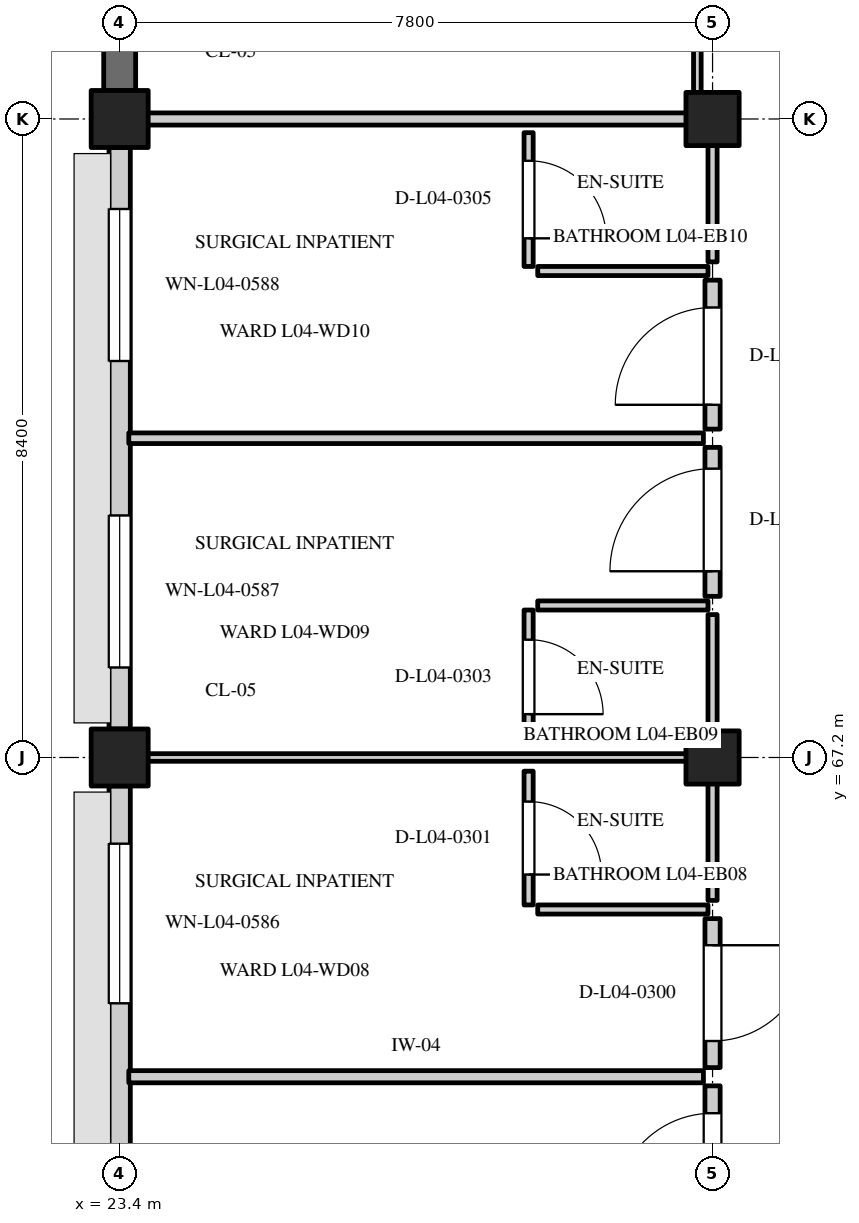
"""IFC4 building model, lengths in metres.
Left out: names, types, materials, properties, quantities, classifications, styles, units other than length and angle.
Written with IfcOpenShell. Run it as: python <this file> out.ifc"""

import sys

from ifc_helpers import new_model, si_unit, direction, frame, frame_2d, origin, origin_2d, place, context, subcontext, project, spatial, rectangle, extrude, element, fill, save


model = new_model("IFC4")
c1 = context("Model", 3, precision=1e-05, world=origin(), true_north=direction((0.0, 1.0)))
c2 = subcontext(c1, "Body", "Model", "MODEL_VIEW")
j1 = project(units=[si_unit("LENGTHUNIT", "METRE"), si_unit("PLANEANGLEUNIT", "RADIAN")], contexts=[c1])
p1 = place(None, origin())
s1 = spatial("IfcSite", under=j1, at=p1, CompositionType="ELEMENT")
p2 = place(p1, origin())
s2 = spatial("IfcBuilding", under=s1, at=p2, CompositionType="ELEMENT")
p3 = place(p2, frame((0.0, 0.0, 18.0)))
s3 = spatial("IfcBuildingStorey", under=s2, at=p3, CompositionType="ELEMENT", Elevation=18.0)
for number, where, z_axis, x_axis in (
    (1, (23.4, 67.2, 0.0), (0.0, 0.0, 1.0), (1.0, 0.0, 0.0)),
    (2, (23.4, 75.6, 0.0), (0.0, 0.0, 1.0), (1.0, 0.0, 0.0)),
):
    element("IfcColumn", number, at=place(p3, frame(where, z_axis=z_axis, x_axis=x_axis)), inside=s3, PredefinedType="COLUMN", context=c2, shape_type="SweptSolid", body=[
        extrude(rectangle(XDim=0.75, YDim=0.75, at=origin_2d()), origin(), (0.0, 0.0, 1.0), 4.2),
    ])
for number, where, z_axis, x_axis in (
    (3, (31.2, 67.2, 0.0), (0.0, 0.0, 1.0), (1.0, 0.0, 0.0)),
    (4, (31.2, 75.6, 0.0), (0.0, 0.0, 1.0), (1.0, 0.0, 0.0)),
):
    element("IfcColumn", number, at=place(p3, frame(where, z_axis=z_axis, x_axis=x_axis)), inside=s3, PredefinedType="COLUMN", context=c2, shape_type="SweptSolid", body=[
        extrude(rectangle(XDim=0.7, YDim=0.7, at=origin_2d()), origin(), (0.0, 0.0, 1.0), 4.2),
    ])
p4 = place(p3, frame((23.4, 59.175, 0.0), z_axis=(0.0, 0.0, 1.0), x_axis=(0.0, 1.0, 0.0)))
e5 = element("IfcWall", 5, at=p4, inside=s3, PredefinedType="STANDARD", context=c2, shape_type="SweptSolid", body=[
    extrude(rectangle(XDim=7.65, YDim=0.28, at=frame_2d((3.825, 0.0))), origin(), (0.0, 0.0, 1.0), 3.235),
])
p5 = place(p4, frame((0.759, 0.0, 0.8)))
e6 = element("IfcOpeningElement", 6, at=p5, cuts=e5, PredefinedType="OPENING", context=c2, shape_type="SweptSolid", body=[
    extrude(rectangle(XDim=2.1, YDim=1.45, at=frame_2d((1.05, 0.725))), frame((0.0, 0.152, 0.0), z_axis=(0.0, -1.0, 0.0), x_axis=(1.0, 0.0, 0.0)), (0.0, 0.0, 1.0), 0.304),
])
p6 = place(p4, frame((4.791, 0.0, 0.8)))
e7 = element("IfcOpeningElement", 7, at=p6, cuts=e5, PredefinedType="OPENING", context=c2, shape_type="SweptSolid", body=[
    extrude(rectangle(XDim=2.1, YDim=1.45, at=frame_2d((1.05, 0.725))), frame((0.0, 0.152, 0.0), z_axis=(0.0, -1.0, 0.0), x_axis=(1.0, 0.0, 0.0)), (0.0, 0.0, 1.0), 0.304),
])
p7 = place(p3, frame((23.4, 67.575, 0.0), z_axis=(0.0, 0.0, 1.0), x_axis=(0.0, 1.0, 0.0)))
e8 = element("IfcWall", 8, at=p7, inside=s3, PredefinedType="STANDARD", context=c2, shape_type="SweptSolid", body=[
    extrude(rectangle(XDim=7.65, YDim=0.28, at=frame_2d((3.825, 0.0))), origin(), (0.0, 0.0, 1.0), 3.235),
])
p8 = place(p7, frame((0.809, 0.0, 0.8)))
e9 = element("IfcOpeningElement", 9, at=p8, cuts=e8, PredefinedType="OPENING", context=c2, shape_type="SweptSolid", body=[
    extrude(rectangle(XDim=2.0, YDim=1.75, at=frame_2d((1.0, 0.875))), frame((0.0, 0.152, 0.0), z_axis=(0.0, -1.0, 0.0), x_axis=(1.0, 0.0, 0.0)), (0.0, 0.0, 1.0), 0.304),
])
p9 = place(p7, frame((4.841, 0.0, 0.8)))
e10 = element("IfcOpeningElement", 10, at=p9, cuts=e8, PredefinedType="OPENING", context=c2, shape_type="SweptSolid", body=[
    extrude(rectangle(XDim=2.0, YDim=1.75, at=frame_2d((1.0, 0.875))), frame((0.0, 0.152, 0.0), z_axis=(0.0, -1.0, 0.0), x_axis=(1.0, 0.0, 0.0)), (0.0, 0.0, 1.0), 0.304),
])
p10 = place(p3, frame((23.4, 75.975, 0.0), z_axis=(0.0, 0.0, 1.0), x_axis=(0.0, 1.0, 0.0)))
e11 = element("IfcWall", 11, at=p10, inside=s3, PredefinedType="SOLIDWALL", context=c2, shape_type="SweptSolid", body=[
    extrude(rectangle(XDim=7.65, YDim=0.42, at=frame_2d((3.825, 0.0))), origin(), (0.0, 0.0, 1.0), 3.235),
])
p11 = place(p10, frame((3.375, 0.0, 0.8)))
e12 = element("IfcOpeningElement", 12, at=p11, cuts=e11, PredefinedType="OPENING", context=c2, shape_type="SweptSolid", body=[
    extrude(rectangle(XDim=0.9, YDim=1.3, at=frame_2d((0.45, 0.65))), frame((0.0, 0.222, 0.0), z_axis=(0.0, -1.0, 0.0), x_axis=(1.0, 0.0, 0.0)), (0.0, 0.0, 1.0), 0.444),
])
p12 = place(p3, frame((23.52, 63.0, 0.0), z_axis=(0.0, 0.0, 1.0), x_axis=(1.0, 0.0, 0.0)))
e13 = element("IfcWall", 13, at=p12, inside=s3, PredefinedType="PARTITIONING", context=c2, shape_type="SweptSolid", body=[
    extrude(rectangle(XDim=7.56, YDim=0.16, at=frame_2d((3.78, 0.0))), origin(), (0.0, 0.0, 1.0), 3.865),
])
p13 = place(p3, frame((31.2, 60.92, 0.0), z_axis=(0.0, 0.0, 1.0), x_axis=(0.0, 1.0, 0.0)))
e14 = element("IfcWall", 14, at=p13, inside=s3, PredefinedType="STANDARD", context=c2, shape_type="SweptSolid", body=[
    extrude(rectangle(XDim=1.96, YDim=0.2, at=frame_2d((0.98, 0.0))), origin(), (0.0, 0.0, 1.0), 3.865),
])
p14 = place(p13, frame((0.32, 0.0, 0.0)))
e15 = element("IfcOpeningElement", 15, at=p14, cuts=e14, PredefinedType="OPENING", context=c2, shape_type="SweptSolid", body=[
    extrude(rectangle(XDim=1.28, YDim=2.15, at=frame_2d((0.64, 1.075))), frame((0.0, 0.112, 0.0), z_axis=(0.0, -1.0, 0.0), x_axis=(1.0, 0.0, 0.0)), (0.0, 0.0, 1.0), 0.224),
])
p15 = place(p3, frame((23.52, 67.2, 0.0), z_axis=(0.0, 0.0, 1.0), x_axis=(1.0, 0.0, 0.0)))
e16 = element("IfcWall", 16, at=p15, inside=s3, PredefinedType="PARTITIONING", context=c2, shape_type="SweptSolid", body=[
    extrude(rectangle(XDim=7.56, YDim=0.1, at=frame_2d((3.78, 0.0))), origin(), (0.0, 0.0, 1.0), 3.865),
])
p16 = place(p3, frame((31.2, 63.12, 0.0), z_axis=(0.0, 0.0, 1.0), x_axis=(0.0, 1.0, 0.0)))
e17 = element("IfcWall", 17, at=p16, inside=s3, PredefinedType="STANDARD", context=c2, shape_type="SweptSolid", body=[
    extrude(rectangle(XDim=1.96, YDim=0.2, at=frame_2d((0.98, 0.0))), origin(), (0.0, 0.0, 1.0), 3.865),
])
p17 = place(p16, frame((0.35, 0.0, 0.0)))
e18 = element("IfcOpeningElement", 18, at=p17, cuts=e17, PredefinedType="OPENING", context=c2, shape_type="SweptSolid", body=[
    extrude(rectangle(XDim=1.26, YDim=2.1, at=frame_2d((0.63, 1.05))), frame((0.0, 0.112, 0.0), z_axis=(0.0, -1.0, 0.0), x_axis=(1.0, 0.0, 0.0)), (0.0, 0.0, 1.0), 0.224),
])
p18 = place(p3, frame((31.2, 65.32, 0.0), z_axis=(0.0, 0.0, 1.0), x_axis=(0.0, 1.0, 0.0)))
e19 = element("IfcWall", 19, at=p18, inside=s3, PredefinedType="PARTITIONING", context=c2, shape_type="SweptSolid", body=[
    extrude(rectangle(XDim=1.76, YDim=0.12, at=frame_2d((0.88, 0.0))), origin(), (0.0, 0.0, 1.0), 3.865),
])
p19 = place(p3, frame((28.9, 65.2, 0.0), z_axis=(0.0, 0.0, 1.0), x_axis=(1.0, 0.0, 0.0)))
e20 = element("IfcWall", 20, at=p19, inside=s3, PredefinedType="PARTITIONING", context=c2, shape_type="SweptSolid", body=[
    extrude(rectangle(XDim=2.24, YDim=0.12, at=frame_2d((1.12, 0.0))), origin(), (0.0, 0.0, 1.0), 3.865),
])
p20 = place(p3, frame((28.78, 65.26, 0.0), z_axis=(0.0, 0.0, 1.0), x_axis=(0.0, 1.0, 0.0)))
e21 = element("IfcWall", 21, at=p20, inside=s3, PredefinedType="PARTITIONING", context=c2, shape_type="SweptSolid", body=[
    extrude(rectangle(XDim=1.76, YDim=0.12, at=frame_2d((0.88, 0.0))), origin(), (0.0, 0.0, 1.0), 3.865),
])
p21 = place(p20, frame((0.4, 0.0, 0.0)))
e22 = element("IfcOpeningElement", 22, at=p21, cuts=e21, PredefinedType="OPENING", context=c2, shape_type="SweptSolid", body=[
    extrude(rectangle(XDim=0.96, YDim=2.12, at=frame_2d((0.48, 1.06))), frame((0.0, 0.072, 0.0), z_axis=(0.0, -1.0, 0.0), x_axis=(1.0, 0.0, 0.0)), (0.0, 0.0, 1.0), 0.144),
])
p22 = place(p3, frame((23.52, 71.4, 0.0), z_axis=(0.0, 0.0, 1.0), x_axis=(1.0, 0.0, 0.0)))
e23 = element("IfcWall", 23, at=p22, inside=s3, PredefinedType="PARTITIONING", context=c2, shape_type="SweptSolid", body=[
    extrude(rectangle(XDim=7.56, YDim=0.14, at=frame_2d((3.78, 0.0))), origin(), (0.0, 0.0, 1.0), 3.865),
])
p23 = place(p3, frame((31.2, 69.32, 0.0), z_axis=(0.0, 0.0, 1.0), x_axis=(0.0, 1.0, 0.0)))
e24 = element("IfcWall", 24, at=p23, inside=s3, PredefinedType="STANDARD", context=c2, shape_type="SweptSolid", body=[
    extrude(rectangle(XDim=1.96, YDim=0.2, at=frame_2d((0.98, 0.0))), origin(), (0.0, 0.0, 1.0), 3.865),
])
p24 = place(p23, frame((0.33, 0.0, 0.0)))
e25 = element("IfcOpeningElement", 25, at=p24, cuts=e24, PredefinedType="OPENING", context=c2, shape_type="SweptSolid", body=[
    extrude(rectangle(XDim=1.35, YDim=2.15, at=frame_2d((0.675, 1.075))), frame((0.0, 0.112, 0.0), z_axis=(0.0, -1.0, 0.0), x_axis=(1.0, 0.0, 0.0)), (0.0, 0.0, 1.0), 0.224),
])
p25 = place(p3, frame((31.2, 67.32, 0.0), z_axis=(0.0, 0.0, 1.0), x_axis=(0.0, 1.0, 0.0)))
e26 = element("IfcWall", 26, at=p25, inside=s3, PredefinedType="PARTITIONING", context=c2, shape_type="SweptSolid", body=[
    extrude(rectangle(XDim=1.76, YDim=0.12, at=frame_2d((0.88, 0.0))), origin(), (0.0, 0.0, 1.0), 3.865),
])
p26 = place(p3, frame((28.9, 69.2, 0.0), z_axis=(0.0, 0.0, 1.0), x_axis=(1.0, 0.0, 0.0)))
e27 = element("IfcWall", 27, at=p26, inside=s3, PredefinedType="PARTITIONING", context=c2, shape_type="SweptSolid", body=[
    extrude(rectangle(XDim=2.24, YDim=0.12, at=frame_2d((1.12, 0.0))), origin(), (0.0, 0.0, 1.0), 3.865),
])
p27 = place(p3, frame((28.78, 67.38, 0.0), z_axis=(0.0, 0.0, 1.0), x_axis=(0.0, 1.0, 0.0)))
e28 = element("IfcWall", 28, at=p27, inside=s3, PredefinedType="PARTITIONING", context=c2, shape_type="SweptSolid", body=[
    extrude(rectangle(XDim=1.76, YDim=0.12, at=frame_2d((0.88, 0.0))), origin(), (0.0, 0.0, 1.0), 3.865),
])
p28 = place(p27, frame((0.39, 0.0, 0.0)))
e29 = element("IfcOpeningElement", 29, at=p28, cuts=e28, PredefinedType="OPENING", context=c2, shape_type="SweptSolid", body=[
    extrude(rectangle(XDim=0.98, YDim=2.1, at=frame_2d((0.49, 1.05))), frame((0.0, 0.072, 0.0), z_axis=(0.0, -1.0, 0.0), x_axis=(1.0, 0.0, 0.0)), (0.0, 0.0, 1.0), 0.144),
])
p29 = place(p3, frame((23.52, 75.6, 0.0), z_axis=(0.0, 0.0, 1.0), x_axis=(1.0, 0.0, 0.0)))
e30 = element("IfcWall", 30, at=p29, inside=s3, PredefinedType="PARTITIONING", context=c2, shape_type="SweptSolid", body=[
    extrude(rectangle(XDim=7.56, YDim=0.16, at=frame_2d((3.78, 0.0))), origin(), (0.0, 0.0, 1.0), 3.235),
])
p30 = place(p3, frame((31.2, 71.52, 0.0), z_axis=(0.0, 0.0, 1.0), x_axis=(0.0, 1.0, 0.0)))
e31 = element("IfcWall", 31, at=p30, inside=s3, PredefinedType="STANDARD", context=c2, shape_type="SweptSolid", body=[
    extrude(rectangle(XDim=1.96, YDim=0.2, at=frame_2d((0.98, 0.0))), origin(), (0.0, 0.0, 1.0), 3.865),
])
p31 = place(p30, frame((0.32, 0.0, 0.0)))
e32 = element("IfcOpeningElement", 32, at=p31, cuts=e31, PredefinedType="OPENING", context=c2, shape_type="SweptSolid", body=[
    extrude(rectangle(XDim=1.28, YDim=2.15, at=frame_2d((0.64, 1.075))), frame((0.0, 0.112, 0.0), z_axis=(0.0, -1.0, 0.0), x_axis=(1.0, 0.0, 0.0)), (0.0, 0.0, 1.0), 0.224),
])
p32 = place(p3, frame((31.2, 73.72, 0.0), z_axis=(0.0, 0.0, 1.0), x_axis=(0.0, 1.0, 0.0)))
e33 = element("IfcWall", 33, at=p32, inside=s3, PredefinedType="PARTITIONING", context=c2, shape_type="SweptSolid", body=[
    extrude(rectangle(XDim=1.76, YDim=0.12, at=frame_2d((0.88, 0.0))), origin(), (0.0, 0.0, 1.0), 3.865),
])
p33 = place(p3, frame((28.9, 73.6, 0.0), z_axis=(0.0, 0.0, 1.0), x_axis=(1.0, 0.0, 0.0)))
e34 = element("IfcWall", 34, at=p33, inside=s3, PredefinedType="PARTITIONING", context=c2, shape_type="SweptSolid", body=[
    extrude(rectangle(XDim=2.24, YDim=0.12, at=frame_2d((1.12, 0.0))), origin(), (0.0, 0.0, 1.0), 3.865),
])
p34 = place(p3, frame((28.78, 73.66, 0.0), z_axis=(0.0, 0.0, 1.0), x_axis=(0.0, 1.0, 0.0)))
e35 = element("IfcWall", 35, at=p34, inside=s3, PredefinedType="PARTITIONING", context=c2, shape_type="SweptSolid", body=[
    extrude(rectangle(XDim=1.76, YDim=0.12, at=frame_2d((0.88, 0.0))), origin(), (0.0, 0.0, 1.0), 3.865),
])
p35 = place(p34, frame((0.37, 0.0, 0.0)))
e36 = element("IfcOpeningElement", 36, at=p35, cuts=e35, PredefinedType="OPENING", context=c2, shape_type="SweptSolid", body=[
    extrude(rectangle(XDim=1.02, YDim=2.15, at=frame_2d((0.51, 1.075))), frame((0.0, 0.072, 0.0), z_axis=(0.0, -1.0, 0.0), x_axis=(1.0, 0.0, 0.0)), (0.0, 0.0, 1.0), 0.144),
])
p36 = place(p3, frame((31.0, 75.885, 0.0), z_axis=(0.0, 0.0, 1.0), x_axis=(0.0, 1.0, 0.0)))
e37 = element("IfcWall", 37, at=p36, inside=s3, PredefinedType="PARTITIONING", context=c2, shape_type="SweptSolid", body=[
    extrude(rectangle(XDim=8.195, YDim=0.1, at=frame_2d((4.098, 0.0))), origin(), (0.0, 0.0, 1.0), 3.865),
])
p37 = place(p36, frame((2.348, 0.0, 0.0)))
e38 = element("IfcOpeningElement", 38, at=p37, cuts=e37, PredefinedType="OPENING", context=c2, shape_type="SweptSolid", body=[
    extrude(rectangle(XDim=1.4, YDim=2.25, at=frame_2d((0.7, 1.125))), frame((0.0, 0.062, 0.0), z_axis=(0.0, -1.0, 0.0), x_axis=(1.0, 0.0, 0.0)), (0.0, 0.0, 1.0), 0.124),
])
p38 = place(p6, origin())
e39 = element("IfcWindow", 39, at=p38, inside=s3, PartitioningType="DOUBLE_PANEL_VERTICAL", PredefinedType="WINDOW", context=c2, shape_type="SweptSolid", body=[
    extrude(rectangle(XDim=2.1, YDim=1.45, at=frame_2d((1.05, 0.725))), frame((0.0, 0.03, 0.0), z_axis=(0.0, -1.0, 0.0), x_axis=(1.0, 0.0, 0.0)), (0.0, 0.0, 1.0), 0.06),
])
fill(e7, e39)
p39 = place(p8, origin())
e40 = element("IfcWindow", 40, at=p39, inside=s3, PartitioningType="DOUBLE_PANEL_VERTICAL", PredefinedType="WINDOW", context=c2, shape_type="SweptSolid", body=[
    extrude(rectangle(XDim=2.0, YDim=1.75, at=frame_2d((1.0, 0.875))), frame((0.0, 0.03, 0.0), z_axis=(0.0, -1.0, 0.0), x_axis=(1.0, 0.0, 0.0)), (0.0, 0.0, 1.0), 0.06),
])
fill(e9, e40)
p40 = place(p9, origin())
e41 = element("IfcWindow", 41, at=p40, inside=s3, PartitioningType="DOUBLE_PANEL_VERTICAL", PredefinedType="WINDOW", context=c2, shape_type="SweptSolid", body=[
    extrude(rectangle(XDim=2.0, YDim=1.75, at=frame_2d((1.0, 0.875))), frame((0.0, 0.03, 0.0), z_axis=(0.0, -1.0, 0.0), x_axis=(1.0, 0.0, 0.0)), (0.0, 0.0, 1.0), 0.06),
])
fill(e10, e41)
p41 = place(p14, origin())
e42 = element("IfcDoor", 42, at=p41, inside=s3, OperationType="SINGLE_SWING_LEFT", PredefinedType="DOOR", context=c2, shape_type="SweptSolid", body=[
    extrude(rectangle(XDim=1.28, YDim=2.15, at=frame_2d((0.64, 1.075))), frame((0.0, 0.025, 0.0), z_axis=(0.0, -1.0, 0.0), x_axis=(1.0, 0.0, 0.0)), (0.0, 0.0, 1.0), 0.05),
])
fill(e15, e42)
p42 = place(p17, origin())
e43 = element("IfcDoor", 43, at=p42, inside=s3, OperationType="SINGLE_SWING_RIGHT", PredefinedType="DOOR", context=c2, shape_type="SweptSolid", body=[
    extrude(rectangle(XDim=1.26, YDim=2.1, at=frame_2d((0.63, 1.05))), frame((0.0, 0.025, 0.0), z_axis=(0.0, -1.0, 0.0), x_axis=(1.0, 0.0, 0.0)), (0.0, 0.0, 1.0), 0.05),
])
fill(e18, e43)
p43 = place(p21, frame((0.96, 0.0, 0.0), z_axis=(0.0, 0.0, 1.0), x_axis=(-1.0, 0.0, 0.0)))
e44 = element("IfcDoor", 44, at=p43, inside=s3, OperationType="SINGLE_SWING_RIGHT", PredefinedType="DOOR", context=c2, shape_type="SweptSolid", body=[
    extrude(rectangle(XDim=0.96, YDim=2.12, at=frame_2d((0.48, 1.06))), frame((0.0, 0.025, 0.0), z_axis=(0.0, -1.0, 0.0), x_axis=(1.0, 0.0, 0.0)), (0.0, 0.0, 1.0), 0.05),
])
fill(e22, e44)
p44 = place(p24, origin())
e45 = element("IfcDoor", 45, at=p44, inside=s3, OperationType="SINGLE_SWING_LEFT", PredefinedType="DOOR", context=c2, shape_type="SweptSolid", body=[
    extrude(rectangle(XDim=1.35, YDim=2.15, at=frame_2d((0.675, 1.075))), frame((0.0, 0.025, 0.0), z_axis=(0.0, -1.0, 0.0), x_axis=(1.0, 0.0, 0.0)), (0.0, 0.0, 1.0), 0.05),
])
fill(e25, e45)
p45 = place(p28, frame((0.98, 0.0, 0.0), z_axis=(0.0, 0.0, 1.0), x_axis=(-1.0, 0.0, 0.0)))
e46 = element("IfcDoor", 46, at=p45, inside=s3, OperationType="SINGLE_SWING_RIGHT", PredefinedType="DOOR", context=c2, shape_type="SweptSolid", body=[
    extrude(rectangle(XDim=0.98, YDim=2.1, at=frame_2d((0.49, 1.05))), frame((0.0, 0.025, 0.0), z_axis=(0.0, -1.0, 0.0), x_axis=(1.0, 0.0, 0.0)), (0.0, 0.0, 1.0), 0.05),
])
fill(e29, e46)
p46 = place(p31, origin())
e47 = element("IfcDoor", 47, at=p46, inside=s3, OperationType="SINGLE_SWING_LEFT", PredefinedType="DOOR", context=c2, shape_type="SweptSolid", body=[
    extrude(rectangle(XDim=1.28, YDim=2.15, at=frame_2d((0.64, 1.075))), frame((0.0, 0.025, 0.0), z_axis=(0.0, -1.0, 0.0), x_axis=(1.0, 0.0, 0.0)), (0.0, 0.0, 1.0), 0.05),
])
fill(e32, e47)
p47 = place(p35, frame((1.02, 0.0, 0.0), z_axis=(0.0, 0.0, 1.0), x_axis=(-1.0, 0.0, 0.0)))
e48 = element("IfcDoor", 48, at=p47, inside=s3, OperationType="SINGLE_SWING_RIGHT", PredefinedType="DOOR", context=c2, shape_type="SweptSolid", body=[
    extrude(rectangle(XDim=1.02, YDim=2.15, at=frame_2d((0.51, 1.075))), frame((0.0, 0.025, 0.0), z_axis=(0.0, -1.0, 0.0), x_axis=(1.0, 0.0, 0.0)), (0.0, 0.0, 1.0), 0.05),
])
fill(e36, e48)
save(model, sys.argv[1])
